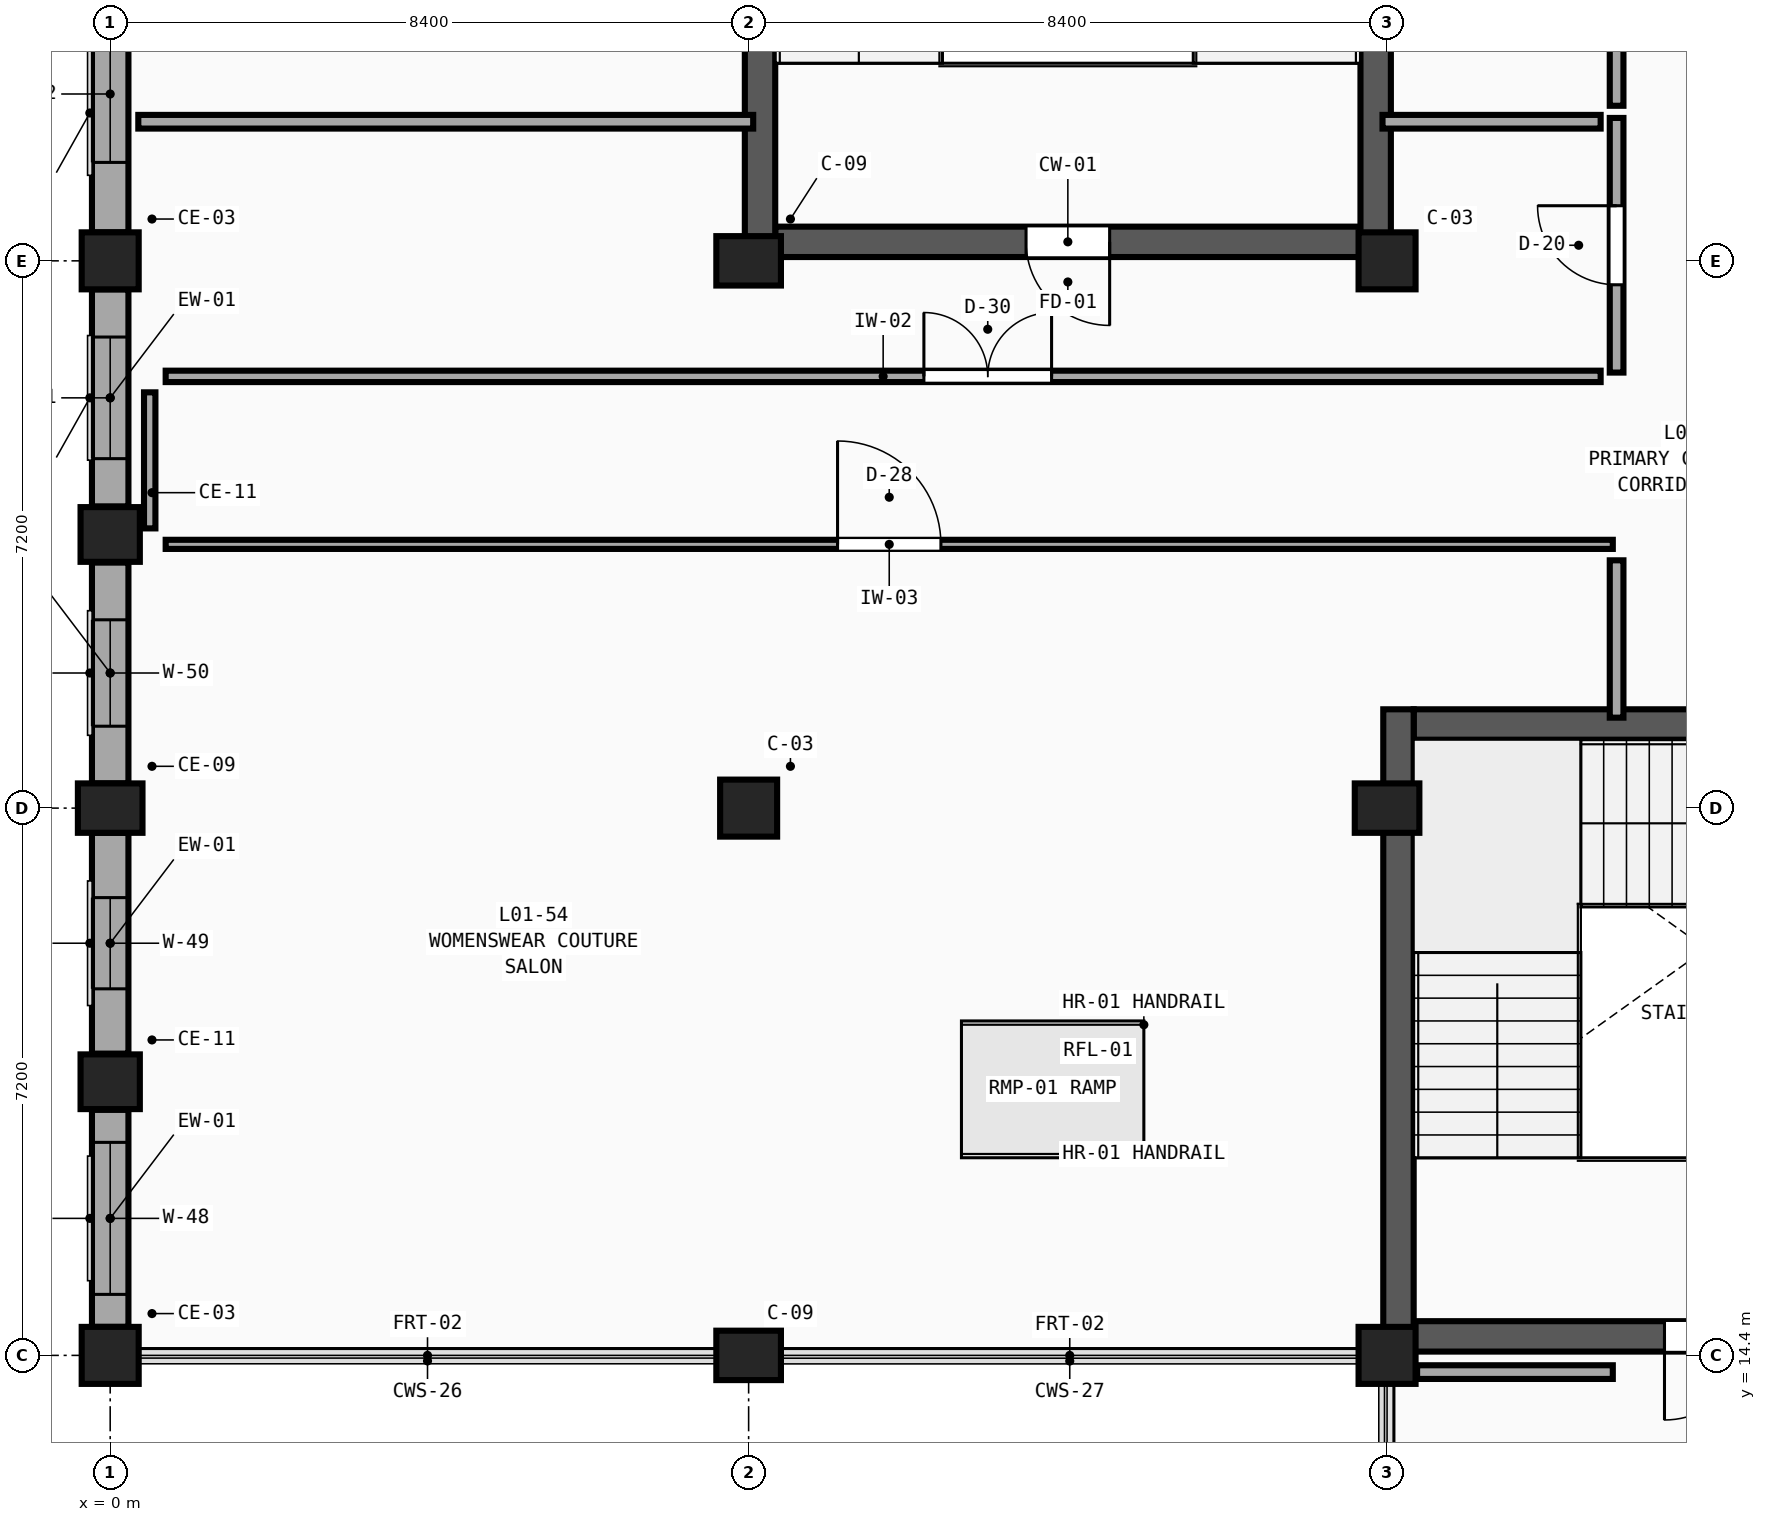
"""IFC4 building model, lengths in metres.
Left out: names, types, materials, properties, quantities, classifications, styles, units other than length and angle.
Written with IfcOpenShell. Run it as: python <this file> out.ifc"""

import sys

from ifc_helpers import new_model, si_unit, direction, frame, frame_2d, origin, origin_2d, place, context, subcontext, project, spatial, rectangle, extrude, element, fill, save


model = new_model("IFC4")
c1 = context("Model", 3, precision=1e-05, world=origin(), true_north=direction((0.0, 1.0)))
c2 = subcontext(c1, "Body", "Model", "MODEL_VIEW")
j1 = project(units=[si_unit("LENGTHUNIT", "METRE"), si_unit("PLANEANGLEUNIT", "RADIAN")], contexts=[c1])
p1 = place(None, origin())
s1 = spatial("IfcSite", under=j1, at=p1, CompositionType="ELEMENT")
p2 = place(p1, origin())
s2 = spatial("IfcBuilding", under=s1, at=p2, CompositionType="ELEMENT")
p3 = place(p2, frame((0.0, 0.0, 5.4)))
s3 = spatial("IfcBuildingStorey", under=s2, at=p3, CompositionType="ELEMENT", Elevation=5.4)
p4 = place(p3, frame((0.0, 14.4, 0.0), z_axis=(0.0, 0.0, 1.0), x_axis=(1.0, 0.0, 0.0)))
e1 = element("IfcColumn", 1, at=p4, inside=s3, PredefinedType="COLUMN", context=c2, shape_type="SweptSolid", body=[
    extrude(rectangle(XDim=0.75, YDim=0.75, at=origin_2d()), origin(), (0.0, 0.0, 1.0), 4.5),
])
p5 = place(p3, frame((0.0, 21.6, 0.0), z_axis=(0.0, 0.0, 1.0), x_axis=(1.0, 0.0, 0.0)))
e2 = element("IfcColumn", 2, at=p5, inside=s3, PredefinedType="COLUMN", context=c2, shape_type="SweptSolid", body=[
    extrude(rectangle(XDim=0.85, YDim=0.65, at=origin_2d()), origin(), (0.0, 0.0, 1.0), 4.5),
])
p6 = place(p3, frame((0.0, 28.8, 0.0), z_axis=(0.0, 0.0, 1.0), x_axis=(1.0, 0.0, 0.0)))
e3 = element("IfcColumn", 3, at=p6, inside=s3, PredefinedType="COLUMN", context=c2, shape_type="SweptSolid", body=[
    extrude(rectangle(XDim=0.75, YDim=0.75, at=origin_2d()), origin(), (0.0, 0.0, 1.0), 4.5),
])
p7 = place(p3, frame((8.4, 14.4, 0.0), z_axis=(0.0, 0.0, 1.0), x_axis=(1.0, 0.0, 0.0)))
e4 = element("IfcColumn", 4, at=p7, inside=s3, PredefinedType="COLUMN", context=c2, shape_type="SweptSolid", body=[
    extrude(rectangle(XDim=0.85, YDim=0.65, at=origin_2d()), origin(), (0.0, 0.0, 1.0), 4.5),
])
p8 = place(p3, frame((8.4, 21.6, 0.0), z_axis=(0.0, 0.0, 1.0), x_axis=(1.0, 0.0, 0.0)))
e5 = element("IfcColumn", 5, at=p8, inside=s3, PredefinedType="COLUMN", context=c2, shape_type="SweptSolid", body=[
    extrude(rectangle(XDim=0.75, YDim=0.75, at=origin_2d()), origin(), (0.0, 0.0, 1.0), 4.5),
])
p9 = place(p3, frame((8.4, 28.8, 0.0), z_axis=(0.0, 0.0, 1.0), x_axis=(1.0, 0.0, 0.0)))
e6 = element("IfcColumn", 6, at=p9, inside=s3, PredefinedType="COLUMN", context=c2, shape_type="SweptSolid", body=[
    extrude(rectangle(XDim=0.85, YDim=0.65, at=origin_2d()), origin(), (0.0, 0.0, 1.0), 4.5),
])
p10 = place(p3, frame((16.8, 14.4, 0.0), z_axis=(0.0, 0.0, 1.0), x_axis=(1.0, 0.0, 0.0)))
e7 = element("IfcColumn", 7, at=p10, inside=s3, PredefinedType="COLUMN", context=c2, shape_type="SweptSolid", body=[
    extrude(rectangle(XDim=0.75, YDim=0.75, at=origin_2d()), origin(), (0.0, 0.0, 1.0), 4.5),
])
p11 = place(p3, frame((16.8, 21.6, 0.0), z_axis=(0.0, 0.0, 1.0), x_axis=(1.0, 0.0, 0.0)))
e8 = element("IfcColumn", 8, at=p11, inside=s3, PredefinedType="COLUMN", context=c2, shape_type="SweptSolid", body=[
    extrude(rectangle(XDim=0.85, YDim=0.65, at=origin_2d()), origin(), (0.0, 0.0, 1.0), 4.5),
])
p12 = place(p3, frame((16.8, 28.8, 0.0), z_axis=(0.0, 0.0, 1.0), x_axis=(1.0, 0.0, 0.0)))
e9 = element("IfcColumn", 9, at=p12, inside=s3, PredefinedType="COLUMN", context=c2, shape_type="SweptSolid", body=[
    extrude(rectangle(XDim=0.75, YDim=0.75, at=origin_2d()), origin(), (0.0, 0.0, 1.0), 4.5),
])
for number, where, z_axis, x_axis in (
    (10, (0.0, 18.0, 0.0), (0.0, 0.0, 1.0), (1.0, 0.0, 0.0)),
    (11, (0.0, 25.2, 0.0), (0.0, 0.0, 1.0), (1.0, 0.0, 0.0)),
):
    element("IfcColumn", number, at=place(p3, frame(where, z_axis=z_axis, x_axis=x_axis)), inside=s3, PredefinedType="PILASTER", context=c2, shape_type="SweptSolid", body=[
        extrude(rectangle(XDim=0.78, YDim=0.72, at=origin_2d()), origin(), (0.0, 0.0, 1.0), 4.5),
    ])
p13 = place(p3, frame((0.0, 14.775, 0.0), z_axis=(0.0, 0.0, 1.0), x_axis=(0.0, 1.0, 0.0)))
e12 = element("IfcWall", 12, at=p13, inside=s3, PredefinedType="SOLIDWALL", context=c2, shape_type="SweptSolid", body=[
    extrude(rectangle(XDim=2.855, YDim=0.48, at=frame_2d((1.427, 0.0))), origin(), (0.0, 0.0, 1.0), 3.63),
])
p14 = place(p13, frame((0.427, 0.0, 0.75)))
e13 = element("IfcOpeningElement", 13, at=p14, cuts=e12, PredefinedType="OPENING", context=c2, shape_type="SweptSolid", body=[
    extrude(rectangle(XDim=2.0, YDim=2.73, at=frame_2d((1.0, 1.365))), frame((0.0, 0.26, 0.0), z_axis=(0.0, -1.0, 0.0), x_axis=(1.0, 0.0, 0.0)), (0.0, 0.0, 1.0), 0.52),
])
p15 = place(p3, frame((0.0, 18.37, 0.0), z_axis=(0.0, 0.0, 1.0), x_axis=(0.0, 1.0, 0.0)))
e14 = element("IfcWall", 14, at=p15, inside=s3, PredefinedType="SOLIDWALL", context=c2, shape_type="SweptSolid", body=[
    extrude(rectangle(XDim=2.905, YDim=0.48, at=frame_2d((1.452, 0.0))), origin(), (0.0, 0.0, 1.0), 3.63),
])
p16 = place(p15, frame((0.853, 0.0, 0.75)))
e15 = element("IfcOpeningElement", 15, at=p16, cuts=e14, PredefinedType="OPENING", context=c2, shape_type="SweptSolid", body=[
    extrude(rectangle(XDim=1.2, YDim=2.73, at=frame_2d((0.6, 1.365))), frame((0.0, 0.26, 0.0), z_axis=(0.0, -1.0, 0.0), x_axis=(1.0, 0.0, 0.0)), (0.0, 0.0, 1.0), 0.52),
])
p17 = place(p3, frame((0.0, 21.925, 0.0), z_axis=(0.0, 0.0, 1.0), x_axis=(0.0, 1.0, 0.0)))
e16 = element("IfcWall", 16, at=p17, inside=s3, PredefinedType="SOLIDWALL", context=c2, shape_type="SweptSolid", body=[
    extrude(rectangle(XDim=2.905, YDim=0.48, at=frame_2d((1.453, 0.0))), origin(), (0.0, 0.0, 1.0), 3.63),
])
p18 = place(p17, frame((0.752, 0.0, 0.75)))
e17 = element("IfcOpeningElement", 17, at=p18, cuts=e16, PredefinedType="OPENING", context=c2, shape_type="SweptSolid", body=[
    extrude(rectangle(XDim=1.4, YDim=2.73, at=frame_2d((0.7, 1.365))), frame((0.0, 0.26, 0.0), z_axis=(0.0, -1.0, 0.0), x_axis=(1.0, 0.0, 0.0)), (0.0, 0.0, 1.0), 0.52),
])
p19 = place(p3, frame((0.0, 25.57, 0.0), z_axis=(0.0, 0.0, 1.0), x_axis=(0.0, 1.0, 0.0)))
e18 = element("IfcWall", 18, at=p19, inside=s3, PredefinedType="SOLIDWALL", context=c2, shape_type="SweptSolid", body=[
    extrude(rectangle(XDim=2.855, YDim=0.48, at=frame_2d((1.427, 0.0))), origin(), (0.0, 0.0, 1.0), 3.63),
])
p20 = place(p19, frame((0.627, 0.0, 0.75)))
e19 = element("IfcOpeningElement", 19, at=p20, cuts=e18, PredefinedType="OPENING", context=c2, shape_type="SweptSolid", body=[
    extrude(rectangle(XDim=1.6, YDim=2.73, at=frame_2d((0.8, 1.365))), frame((0.0, 0.26, 0.0), z_axis=(0.0, -1.0, 0.0), x_axis=(1.0, 0.0, 0.0)), (0.0, 0.0, 1.0), 0.52),
])
p21 = place(p3, frame((0.0, 29.175, 0.0), z_axis=(0.0, 0.0, 1.0), x_axis=(0.0, 1.0, 0.0)))
e20 = element("IfcWall", 20, at=p21, inside=s3, PredefinedType="SOLIDWALL", context=c2, shape_type="SweptSolid", body=[
    extrude(rectangle(XDim=6.5, YDim=0.48, at=frame_2d((3.25, 0.0))), origin(), (0.0, 0.0, 1.0), 3.63),
])
p22 = place(p21, frame((0.92, 0.0, 0.75)))
e21 = element("IfcOpeningElement", 21, at=p22, cuts=e20, PredefinedType="OPENING", context=c2, shape_type="SweptSolid", body=[
    extrude(rectangle(XDim=1.8, YDim=2.73, at=frame_2d((0.9, 1.365))), frame((0.0, 0.26, 0.0), z_axis=(0.0, -1.0, 0.0), x_axis=(1.0, 0.0, 0.0)), (0.0, 0.0, 1.0), 0.52),
])
p23 = place(p21, frame((3.68, 0.0, 0.75)))
e22 = element("IfcOpeningElement", 22, at=p23, cuts=e20, PredefinedType="OPENING", context=c2, shape_type="SweptSolid", body=[
    extrude(rectangle(XDim=2.0, YDim=2.73, at=frame_2d((1.0, 1.365))), frame((0.0, 0.26, 0.0), z_axis=(0.0, -1.0, 0.0), x_axis=(1.0, 0.0, 0.0)), (0.0, 0.0, 1.0), 0.52),
])
p24 = place(p3, frame((24.85, 14.65, 0.0), z_axis=(0.0, 0.0, 1.0), x_axis=(-1.0, 0.0, 0.0)))
e23 = element("IfcWall", 23, at=p24, inside=s3, PredefinedType="SHEAR", context=c2, shape_type="SweptSolid", body=[
    extrude(rectangle(XDim=7.7, YDim=0.4, at=frame_2d((3.85, 0.0))), origin(), (0.0, 0.0, 1.0), 4.5),
])
p25 = place(p24, frame((3.3, 0.0, 0.0)))
e24 = element("IfcOpeningElement", 24, at=p25, cuts=e23, PredefinedType="OPENING", context=c2, shape_type="SweptSolid", body=[
    extrude(rectangle(XDim=1.1, YDim=2.2, at=frame_2d((0.55, 1.1))), frame((0.0, 0.22, 0.0), z_axis=(0.0, -1.0, 0.0), x_axis=(1.0, 0.0, 0.0)), (0.0, 0.0, 1.0), 0.44),
])
p26 = place(p3, frame((17.15, 22.7, 0.0), z_axis=(0.0, 0.0, 1.0), x_axis=(1.0, 0.0, 0.0)))
e25 = element("IfcWall", 25, at=p26, inside=s3, PredefinedType="SHEAR", context=c2, shape_type="SweptSolid", body=[
    extrude(rectangle(XDim=7.7, YDim=0.4, at=frame_2d((3.85, 0.0))), origin(), (0.0, 0.0, 1.0), 4.5),
])
p27 = place(p3, frame((16.95, 22.9, 0.0), z_axis=(0.0, 0.0, 1.0), x_axis=(0.0, -1.0, 0.0)))
e26 = element("IfcWall", 26, at=p27, inside=s3, PredefinedType="SHEAR", context=c2, shape_type="SweptSolid", body=[
    extrude(rectangle(XDim=8.45, YDim=0.4, at=frame_2d((4.225, 0.0))), origin(), (0.0, 0.0, 1.0), 4.5),
])
p28 = place(p3, frame((16.45, 29.05, 0.0), z_axis=(0.0, 0.0, 1.0), x_axis=(-1.0, 0.0, 0.0)))
e27 = element("IfcWall", 27, at=p28, inside=s3, PredefinedType="SHEAR", context=c2, shape_type="SweptSolid", body=[
    extrude(rectangle(XDim=7.7, YDim=0.4, at=frame_2d((3.85, 0.0))), origin(), (0.0, 0.0, 1.0), 4.5),
])
p29 = place(p28, frame((3.3, 0.0, 0.0)))
e28 = element("IfcOpeningElement", 28, at=p29, cuts=e27, PredefinedType="OPENING", context=c2, shape_type="SweptSolid", body=[
    extrude(rectangle(XDim=1.1, YDim=2.2, at=frame_2d((0.55, 1.1))), frame((0.0, 0.22, 0.0), z_axis=(0.0, -1.0, 0.0), x_axis=(1.0, 0.0, 0.0)), (0.0, 0.0, 1.0), 0.44),
])
for number, where, z_axis, x_axis in (
    (29, (8.55, 37.3, 0.0), (0.0, 0.0, 1.0), (0.0, -1.0, 0.0)),
    (30, (16.65, 28.85, 0.0), (0.0, 0.0, 1.0), (0.0, 1.0, 0.0)),
):
    element("IfcWall", number, at=place(p3, frame(where, z_axis=z_axis, x_axis=x_axis)), inside=s3, PredefinedType="SHEAR", context=c2, shape_type="SweptSolid", body=[
        extrude(rectangle(XDim=8.45, YDim=0.4, at=frame_2d((4.225, 0.0))), origin(), (0.0, 0.0, 1.0), 4.5),
    ])
p30 = place(p3, frame((0.73, 25.07, 0.0), z_axis=(0.0, 0.0, 1.0), x_axis=(1.0, 0.0, 0.0)))
e31 = element("IfcWall", 31, at=p30, inside=s3, PredefinedType="PARTITIONING", context=c2, shape_type="SweptSolid", body=[
    extrude(rectangle(XDim=19.04, YDim=0.12, at=frame_2d((9.52, 0.0))), origin(), (0.0, 0.0, 1.0), 4.18),
])
p31 = place(p30, frame((8.84, 0.0, 0.0)))
e32 = element("IfcOpeningElement", 32, at=p31, cuts=e31, PredefinedType="OPENING", context=c2, shape_type="SweptSolid", body=[
    extrude(rectangle(XDim=1.36, YDim=2.37, at=frame_2d((0.68, 1.185))), frame((0.0, 0.08, 0.0), z_axis=(0.0, -1.0, 0.0), x_axis=(1.0, 0.0, 0.0)), (0.0, 0.0, 1.0), 0.16),
])
p32 = place(p3, frame((0.73, 27.28, 0.0), z_axis=(0.0, 0.0, 1.0), x_axis=(1.0, 0.0, 0.0)))
e33 = element("IfcWall", 33, at=p32, inside=s3, PredefinedType="PARTITIONING", context=c2, shape_type="SweptSolid", body=[
    extrude(rectangle(XDim=18.88, YDim=0.15, at=frame_2d((9.44, 0.0))), origin(), (0.0, 0.0, 1.0), 4.18),
])
p33 = place(p32, frame((9.976, 0.0, 0.0)))
e34 = element("IfcOpeningElement", 34, at=p33, cuts=e33, PredefinedType="OPENING", context=c2, shape_type="SweptSolid", body=[
    extrude(rectangle(XDim=1.68, YDim=2.37, at=frame_2d((0.84, 1.185))), frame((0.0, 0.095, 0.0), z_axis=(0.0, -1.0, 0.0), x_axis=(1.0, 0.0, 0.0)), (0.0, 0.0, 1.0), 0.19),
])
p34 = place(p3, frame((19.82, 30.84, 0.0), z_axis=(0.0, 0.0, 1.0), x_axis=(0.0, 1.0, 0.0)))
e35 = element("IfcWall", 35, at=p34, inside=s3, PredefinedType="PARTITIONING", context=c2, shape_type="SweptSolid", body=[
    extrude(rectangle(XDim=5.96, YDim=0.18, at=frame_2d((2.98, 0.0))), origin(), (0.0, 0.0, 1.0), 4.18),
])
p35 = place(p34, frame((2.22, 0.0, 0.0)))
e36 = element("IfcOpeningElement", 36, at=p35, cuts=e35, PredefinedType="OPENING", context=c2, shape_type="SweptSolid", body=[
    extrude(rectangle(XDim=1.52, YDim=2.45, at=frame_2d((0.76, 1.225))), frame((0.0, 0.11, 0.0), z_axis=(0.0, -1.0, 0.0), x_axis=(1.0, 0.0, 0.0)), (0.0, 0.0, 1.0), 0.22),
])
p36 = place(p3, frame((19.82, 27.33, 0.0), z_axis=(0.0, 0.0, 1.0), x_axis=(0.0, 1.0, 0.0)))
e37 = element("IfcWall", 37, at=p36, inside=s3, PredefinedType="PARTITIONING", context=c2, shape_type="SweptSolid", body=[
    extrude(rectangle(XDim=3.35, YDim=0.18, at=frame_2d((1.675, 0.0))), origin(), (0.0, 0.0, 1.0), 4.18),
])
p37 = place(p36, frame((1.155, 0.0, 0.0)))
e38 = element("IfcOpeningElement", 38, at=p37, cuts=e37, PredefinedType="OPENING", context=c2, shape_type="SweptSolid", body=[
    extrude(rectangle(XDim=1.04, YDim=2.29, at=frame_2d((0.52, 1.145))), frame((0.0, 0.11, 0.0), z_axis=(0.0, -1.0, 0.0), x_axis=(1.0, 0.0, 0.0)), (0.0, 0.0, 1.0), 0.22),
])
p38 = place(p3, frame((17.195, 14.18, 0.0), z_axis=(0.0, 0.0, 1.0), x_axis=(1.0, 0.0, 0.0)))
e39 = element("IfcWall", 39, at=p38, inside=s3, PredefinedType="PARTITIONING", context=c2, shape_type="SweptSolid", body=[
    extrude(rectangle(XDim=2.575, YDim=0.18, at=frame_2d((1.288, 0.0))), origin(), (0.0, 0.0, 1.0), 3.73),
])
p39 = place(p3, frame((19.82, 22.79, 0.0), z_axis=(0.0, 0.0, 1.0), x_axis=(0.0, 1.0, 0.0)))
e40 = element("IfcWall", 40, at=p39, inside=s3, PredefinedType="PARTITIONING", context=c2, shape_type="SweptSolid", body=[
    extrude(rectangle(XDim=2.07, YDim=0.18, at=frame_2d((1.035, 0.0))), origin(), (0.0, 0.0, 1.0), 4.18),
])
p40 = place(p3, frame((0.52, 25.28, 0.0), z_axis=(0.0, 0.0, 1.0), x_axis=(0.0, 1.0, 0.0)))
e41 = element("IfcWall", 41, at=p40, inside=s3, PredefinedType="PARTITIONING", context=c2, shape_type="SweptSolid", body=[
    extrude(rectangle(XDim=1.79, YDim=0.15, at=frame_2d((0.895, 0.0))), origin(), (0.0, 0.0, 1.0), 3.63),
])
p41 = place(p3, frame((0.37, 30.63, 0.0), z_axis=(0.0, 0.0, 1.0), x_axis=(1.0, 0.0, 0.0)))
e42 = element("IfcWall", 42, at=p41, inside=s3, PredefinedType="PARTITIONING", context=c2, shape_type="SweptSolid", body=[
    extrude(rectangle(XDim=8.09, YDim=0.18, at=frame_2d((4.045, 0.0))), origin(), (0.0, 0.0, 1.0), 4.18),
])
p42 = place(p3, frame((16.74, 30.63, 0.0), z_axis=(0.0, 0.0, 1.0), x_axis=(1.0, 0.0, 0.0)))
e43 = element("IfcWall", 43, at=p42, inside=s3, PredefinedType="PARTITIONING", context=c2, shape_type="SweptSolid", body=[
    extrude(rectangle(XDim=2.87, YDim=0.18, at=frame_2d((1.435, 0.0))), origin(), (0.0, 0.0, 1.0), 4.18),
])
p43 = place(p14, origin())
e44 = element("IfcWindow", 44, at=p43, inside=s3, PartitioningType="TRIPLE_PANEL_VERTICAL", PredefinedType="WINDOW", context=c2, shape_type="SweptSolid", body=[
    extrude(rectangle(XDim=2.0, YDim=2.73, at=frame_2d((1.0, 1.365))), frame((0.0, 0.03, 0.0), z_axis=(0.0, -1.0, 0.0), x_axis=(1.0, 0.0, 0.0)), (0.0, 0.0, 1.0), 0.06),
])
fill(e13, e44)
p44 = place(p16, origin())
e45 = element("IfcWindow", 45, at=p44, inside=s3, PartitioningType="SINGLE_PANEL", PredefinedType="WINDOW", context=c2, shape_type="SweptSolid", body=[
    extrude(rectangle(XDim=1.2, YDim=2.73, at=frame_2d((0.6, 1.365))), frame((0.0, 0.03, 0.0), z_axis=(0.0, -1.0, 0.0), x_axis=(1.0, 0.0, 0.0)), (0.0, 0.0, 1.0), 0.06),
])
fill(e15, e45)
p45 = place(p18, origin())
e46 = element("IfcWindow", 46, at=p45, inside=s3, PartitioningType="DOUBLE_PANEL_VERTICAL", PredefinedType="WINDOW", context=c2, shape_type="SweptSolid", body=[
    extrude(rectangle(XDim=1.4, YDim=2.73, at=frame_2d((0.7, 1.365))), frame((0.0, 0.03, 0.0), z_axis=(0.0, -1.0, 0.0), x_axis=(1.0, 0.0, 0.0)), (0.0, 0.0, 1.0), 0.06),
])
fill(e17, e46)
p46 = place(p20, origin())
e47 = element("IfcWindow", 47, at=p46, inside=s3, PartitioningType="DOUBLE_PANEL_VERTICAL", PredefinedType="WINDOW", context=c2, shape_type="SweptSolid", body=[
    extrude(rectangle(XDim=1.6, YDim=2.73, at=frame_2d((0.8, 1.365))), frame((0.0, 0.03, 0.0), z_axis=(0.0, -1.0, 0.0), x_axis=(1.0, 0.0, 0.0)), (0.0, 0.0, 1.0), 0.06),
])
fill(e19, e47)
p47 = place(p22, origin())
e48 = element("IfcWindow", 48, at=p47, inside=s3, PartitioningType="DOUBLE_PANEL_VERTICAL", PredefinedType="WINDOW", context=c2, shape_type="SweptSolid", body=[
    extrude(rectangle(XDim=1.8, YDim=2.73, at=frame_2d((0.9, 1.365))), frame((0.0, 0.03, 0.0), z_axis=(0.0, -1.0, 0.0), x_axis=(1.0, 0.0, 0.0)), (0.0, 0.0, 1.0), 0.06),
])
fill(e21, e48)
p48 = place(p25, origin())
e49 = element("IfcDoor", 49, at=p48, inside=s3, OperationType="SINGLE_SWING_RIGHT", PredefinedType="DOOR", context=c2, shape_type="SweptSolid", body=[
    extrude(rectangle(XDim=1.1, YDim=2.2, at=frame_2d((0.55, 1.1))), frame((0.0, 0.025, 0.0), z_axis=(0.0, -1.0, 0.0), x_axis=(1.0, 0.0, 0.0)), (0.0, 0.0, 1.0), 0.05),
])
fill(e24, e49)
p49 = place(p29, origin())
e50 = element("IfcDoor", 50, at=p49, inside=s3, OperationType="SINGLE_SWING_LEFT", PredefinedType="DOOR", context=c2, shape_type="SweptSolid", body=[
    extrude(rectangle(XDim=1.1, YDim=2.2, at=frame_2d((0.55, 1.1))), frame((0.0, 0.025, 0.0), z_axis=(0.0, -1.0, 0.0), x_axis=(1.0, 0.0, 0.0)), (0.0, 0.0, 1.0), 0.05),
])
fill(e28, e50)
p50 = place(p31, origin())
e51 = element("IfcDoor", 51, at=p50, inside=s3, OperationType="SINGLE_SWING_LEFT", PredefinedType="DOOR", context=c2, shape_type="SweptSolid", body=[
    extrude(rectangle(XDim=1.36, YDim=2.37, at=frame_2d((0.68, 1.185))), frame((0.0, 0.025, 0.0), z_axis=(0.0, -1.0, 0.0), x_axis=(1.0, 0.0, 0.0)), (0.0, 0.0, 1.0), 0.05),
])
fill(e32, e51)
p51 = place(p33, origin())
e52 = element("IfcDoor", 52, at=p51, inside=s3, OperationType="DOUBLE_DOOR_SINGLE_SWING", PredefinedType="DOOR", context=c2, shape_type="SweptSolid", body=[
    extrude(rectangle(XDim=1.68, YDim=2.37, at=frame_2d((0.84, 1.185))), frame((0.0, 0.025, 0.0), z_axis=(0.0, -1.0, 0.0), x_axis=(1.0, 0.0, 0.0)), (0.0, 0.0, 1.0), 0.05),
])
fill(e34, e52)
p52 = place(p37, origin())
e53 = element("IfcDoor", 53, at=p52, inside=s3, OperationType="SINGLE_SWING_RIGHT", PredefinedType="DOOR", context=c2, shape_type="SweptSolid", body=[
    extrude(rectangle(XDim=1.04, YDim=2.29, at=frame_2d((0.52, 1.145))), frame((0.0, 0.025, 0.0), z_axis=(0.0, -1.0, 0.0), x_axis=(1.0, 0.0, 0.0)), (0.0, 0.0, 1.0), 0.05),
])
fill(e38, e53)
save(model, sys.argv[1])
